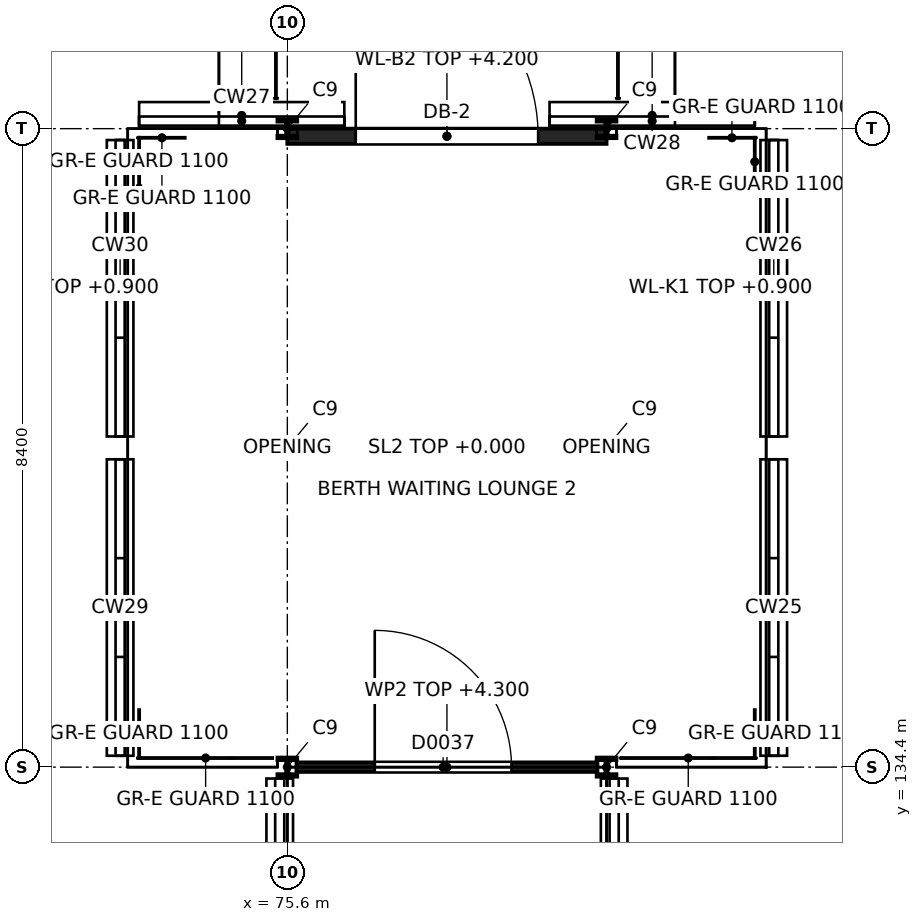
"""IFC4 building model, lengths in metres.
Left out: names, types, materials, properties, quantities, classifications, styles, units other than length and angle.
Written with IfcOpenShell. Run it as: python <this file> out.ifc"""

import sys

from ifc_helpers import new_model, si_unit, direction, frame, frame_2d, origin, origin_2d, place, context, subcontext, project, spatial, rectangle, i_section, extrude, element, fill, save


model = new_model("IFC4")
c1 = context("Model", 3, precision=1e-05, world=origin(), true_north=direction((0.0, 1.0)))
c2 = subcontext(c1, "Body", "Model", "MODEL_VIEW")
j1 = project(units=[si_unit("LENGTHUNIT", "METRE"), si_unit("PLANEANGLEUNIT", "RADIAN")], contexts=[c1])
p1 = place(None, origin())
s1 = spatial("IfcSite", under=j1, at=p1, CompositionType="ELEMENT")
p2 = place(p1, origin())
s2 = spatial("IfcBuilding", under=s1, at=p2, CompositionType="ELEMENT")
p3 = place(p2, origin())
s3 = spatial("IfcBuildingStorey", under=s2, at=p3, CompositionType="ELEMENT", Elevation=0.0)
for number, where, z_axis, x_axis in (
    (1, (75.6, 134.4, -0.45), (0.0, 0.0, 1.0), (1.0, 0.0, 0.0)),
    (2, (79.8, 134.4, -0.45), (0.0, 0.0, 1.0), (1.0, 0.0, 0.0)),
    (3, (75.6, 138.6, -0.45), (0.0, 0.0, 1.0), (1.0, 0.0, 0.0)),
    (4, (79.8, 138.6, -0.45), (0.0, 0.0, 1.0), (1.0, 0.0, 0.0)),
    (5, (75.6, 142.8, -0.45), (0.0, 0.0, 1.0), (1.0, 0.0, 0.0)),
    (6, (79.8, 142.8, -0.45), (0.0, 0.0, 1.0), (1.0, 0.0, 0.0)),
):
    element("IfcColumn", number, at=place(p3, frame(where, z_axis=z_axis, x_axis=x_axis)), inside=s3, PredefinedType="COLUMN", context=c2, shape_type="SweptSolid", body=[
        extrude(i_section(OverallWidth=0.24, OverallDepth=0.23, WebThickness=0.008, FlangeThickness=0.012, at=origin_2d()), origin(), (0.0, 0.0, 1.0), 4.95),
    ])
p4 = place(p3, frame((75.6, 142.7, 0.0), z_axis=(0.0, 0.0, 1.0), x_axis=(1.0, 0.0, 0.0)))
e7 = element("IfcWall", 7, at=p4, inside=s3, PredefinedType="SOLIDWALL", context=c2, shape_type="SweptSolid", body=[
    extrude(rectangle(XDim=4.2, YDim=0.2, at=frame_2d((2.1, 0.0))), origin(), (0.0, 0.0, 1.0), 4.2),
])
p5 = place(p4, frame((0.9, 0.0, 0.0)))
e8 = element("IfcOpeningElement", 8, at=p5, cuts=e7, PredefinedType="OPENING", context=c2, shape_type="SweptSolid", body=[
    extrude(rectangle(XDim=2.4, YDim=2.4, at=frame_2d((1.2, 1.2))), frame((0.0, 0.1, 0.0), z_axis=(0.0, -1.0, 0.0), x_axis=(1.0, 0.0, 0.0)), (0.0, 0.0, 1.0), 0.2),
])
for number, where, z_axis, x_axis in (
    (9, (79.9, 130.35, 0.0), (0.0, 0.0, 1.0), (0.0, 1.0, 0.0)),
    (10, (82.0, 134.55, 0.0), (0.0, 0.0, 1.0), (0.0, 1.0, 0.0)),
    (11, (82.0, 138.75, 0.0), (0.0, 0.0, 1.0), (0.0, 1.0, 0.0)),
):
    element("IfcWall", number, at=place(p3, frame(where, z_axis=z_axis, x_axis=x_axis)), inside=s3, PredefinedType="SOLIDWALL", context=c2, shape_type="SweptSolid", body=[
        extrude(rectangle(XDim=3.9, YDim=0.35, at=frame_2d((1.95, 0.0))), origin(), (0.0, 0.0, 1.0), 0.9),
    ])
p6 = place(p3, frame((73.65, 142.975, 0.0), z_axis=(0.0, 0.0, 1.0), x_axis=(1.0, 0.0, 0.0)))
e12 = element("IfcWall", 12, at=p6, inside=s3, PredefinedType="SOLIDWALL", context=c2, shape_type="SweptSolid", body=[
    extrude(rectangle(XDim=2.7, YDim=0.35, at=frame_2d((1.35, 0.0))), origin(), (0.0, 0.0, 1.0), 0.9),
])
p7 = place(p3, frame((79.05, 142.975, 0.0), z_axis=(0.0, 0.0, 1.0), x_axis=(1.0, 0.0, 0.0)))
e13 = element("IfcWall", 13, at=p7, inside=s3, PredefinedType="SOLIDWALL", context=c2, shape_type="SweptSolid", body=[
    extrude(rectangle(XDim=2.7, YDim=0.35, at=frame_2d((1.35, 0.0))), origin(), (0.0, 0.0, 1.0), 0.9),
])
for number, where, z_axis, x_axis in (
    (14, (73.4, 134.55, 0.0), (0.0, 0.0, 1.0), (0.0, 1.0, 0.0)),
    (15, (73.4, 138.75, 0.0), (0.0, 0.0, 1.0), (0.0, 1.0, 0.0)),
    (16, (75.5, 130.35, 0.0), (0.0, 0.0, 1.0), (0.0, 1.0, 0.0)),
):
    element("IfcWall", number, at=place(p3, frame(where, z_axis=z_axis, x_axis=x_axis)), inside=s3, PredefinedType="SOLIDWALL", context=c2, shape_type="SweptSolid", body=[
        extrude(rectangle(XDim=3.9, YDim=0.35, at=frame_2d((1.95, 0.0))), origin(), (0.0, 0.0, 1.0), 0.9),
    ])
p8 = place(p3, frame((75.72, 134.4, 0.0), z_axis=(0.0, 0.0, 1.0), x_axis=(1.0, 0.0, 0.0)))
e17 = element("IfcWall", 17, at=p8, inside=s3, PredefinedType="PARTITIONING", context=c2, shape_type="SweptSolid", body=[
    extrude(rectangle(XDim=3.96, YDim=0.125, at=frame_2d((1.98, 0.0))), origin(), (0.0, 0.0, 1.0), 4.3),
])
p9 = place(p8, frame((1.03, 0.0, 0.0)))
e18 = element("IfcOpeningElement", 18, at=p9, cuts=e17, PredefinedType="OPENING", context=c2, shape_type="SweptSolid", body=[
    extrude(rectangle(XDim=1.8, YDim=2.1, at=frame_2d((0.9, 1.05))), frame((0.0, 0.062, 0.0), z_axis=(0.0, -1.0, 0.0), x_axis=(1.0, 0.0, 0.0)), (0.0, 0.0, 1.0), 0.125),
])
p10 = place(p5, origin())
e19 = element("IfcDoor", 19, at=p10, inside=s3, OperationType="DOUBLE_DOOR_SINGLE_SWING", PredefinedType="DOOR", context=c2, shape_type="SweptSolid", body=[
    extrude(rectangle(XDim=2.4, YDim=2.4, at=frame_2d((1.2, 1.2))), frame((0.0, 0.025, 0.0), z_axis=(0.0, -1.0, 0.0), x_axis=(1.0, 0.0, 0.0)), (0.0, 0.0, 1.0), 0.05),
])
fill(e8, e19)
p11 = place(p9, origin())
e20 = element("IfcDoor", 20, at=p11, inside=s3, OperationType="DOUBLE_DOOR_DOUBLE_SWING", PredefinedType="DOOR", context=c2, shape_type="SweptSolid", body=[
    extrude(rectangle(XDim=1.8, YDim=2.1, at=frame_2d((0.9, 1.05))), frame((0.0, 0.025, 0.0), z_axis=(0.0, -1.0, 0.0), x_axis=(1.0, 0.0, 0.0)), (0.0, 0.0, 1.0), 0.05),
])
fill(e18, e20)
save(model, sys.argv[1])
